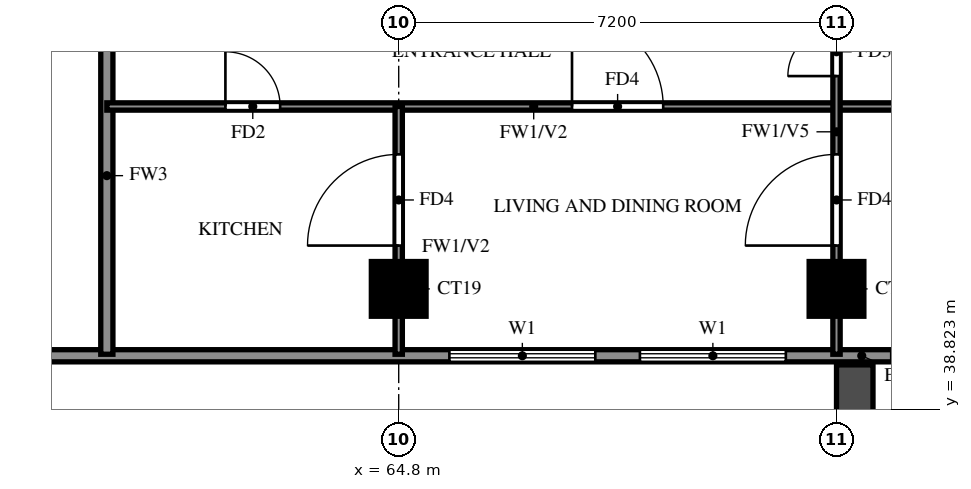
"""IFC4 building model, lengths in metres.
Left out: names, types, materials, properties, quantities, classifications, styles, units other than length and angle.
Written with IfcOpenShell. Run it as: python <this file> out.ifc"""

import sys

from ifc_helpers import new_model, si_unit, direction, frame, frame_2d, origin, origin_2d, place, context, subcontext, project, spatial, rectangle, extrude, source, transform, mapped, element, fill, save


model = new_model("IFC4")
c1 = context("Model", 3, precision=1e-05, world=origin(), true_north=direction((0.0, 1.0)))
c2 = subcontext(c1, "Body", "Model", "MODEL_VIEW")
j1 = project(units=[si_unit("LENGTHUNIT", "METRE"), si_unit("PLANEANGLEUNIT", "RADIAN")], contexts=[c1])
p1 = place(None, origin())
s1 = spatial("IfcSite", under=j1, at=p1, CompositionType="ELEMENT")
p2 = place(p1, origin())
s2 = spatial("IfcBuilding", under=s1, at=p2, CompositionType="ELEMENT")
p3 = place(p2, frame((0.0, 0.0, 199.0)))
s3 = spatial("IfcBuildingStorey", under=s2, at=p3, CompositionType="ELEMENT", Elevation=199.0)
m1 = source(origin(), c2, "Body", "SweptSolid", [
    extrude(rectangle(XDim=0.9, YDim=0.9, at=origin_2d()), origin(), (0.0, 0.0, 1.0), 3.2),
])
for number, where, z_axis, x_axis in (
    (1, (64.8, 40.8, 0.0), (0.0, 0.0, 1.0), (1.0, 0.0, 0.0)),
    (2, (72.0, 40.8, 0.0), (0.0, 0.0, 1.0), (1.0, 0.0, 0.0)),
):
    element("IfcColumn", number, at=place(p3, frame(where, z_axis=z_axis, x_axis=x_axis)), inside=s3, PredefinedType="COLUMN", context=c2, shape_type="MappedRepresentation", body=[
        mapped(m1, transform((0.0, 0.0, 0.0))),
    ])
p4 = place(p3, frame((85.719, 39.881, 0.0), z_axis=(0.0, 0.0, 1.0), x_axis=(-0.86377618652, 0.503875678716, 0.0)))
e3 = element("IfcWall", 3, at=p4, inside=s3, PredefinedType="SOLIDWALL", context=c2, shape_type="SweptSolid", body=[
    extrude(rectangle(XDim=16.311, YDim=0.2, at=frame_2d((8.156, 0.0))), origin(), (0.0, 0.0, 1.0), 3.2),
])
p5 = place(p4, frame((13.326, 0.0, 1.5)))
e4 = element("IfcOpeningElement", 4, at=p5, cuts=e3, PredefinedType="OPENING", context=c2, shape_type="SweptSolid", body=[
    extrude(rectangle(XDim=0.9, YDim=0.9, at=frame_2d((0.45, 0.45))), frame((0.0, 0.11, 0.0), z_axis=(0.0, -1.0, 0.0), x_axis=(1.0, 0.0, 0.0)), (0.0, 0.0, 1.0), 0.22),
])
p6 = place(p3, frame((58.8, 39.7, 0.0), z_axis=(0.0, 0.0, 1.0), x_axis=(1.0, 0.0, 0.0)))
e5 = element("IfcWall", 5, at=p6, inside=s3, PredefinedType="SOLIDWALL", context=c2, shape_type="SweptSolid", body=[
    extrude(rectangle(XDim=27.23, YDim=0.2, at=frame_2d((13.615, 0.0))), origin(), (0.0, 0.0, 1.0), 3.2),
])
p7 = place(p6, frame((15.9, 0.0, 0.0)))
e6 = element("IfcOpeningElement", 6, at=p7, cuts=e5, PredefinedType="OPENING", context=c2, shape_type="SweptSolid", body=[
    extrude(rectangle(XDim=1.8, YDim=2.4, at=frame_2d((0.9, 1.2))), frame((0.0, 0.11, 0.0), z_axis=(0.0, -1.0, 0.0), x_axis=(1.0, 0.0, 0.0)), (0.0, 0.0, 1.0), 0.22),
])
p8 = place(p6, frame((6.833, 0.0, 0.6)))
e7 = element("IfcOpeningElement", 7, at=p8, cuts=e5, PredefinedType="OPENING", context=c2, shape_type="SweptSolid", body=[
    extrude(rectangle(XDim=2.4, YDim=2.4, at=frame_2d((1.2, 1.2))), frame((0.0, 0.11, 0.0), z_axis=(0.0, -1.0, 0.0), x_axis=(1.0, 0.0, 0.0)), (0.0, 0.0, 1.0), 0.22),
])
p9 = place(p6, frame((9.967, 0.0, 0.6)))
e8 = element("IfcOpeningElement", 8, at=p9, cuts=e5, PredefinedType="OPENING", context=c2, shape_type="SweptSolid", body=[
    extrude(rectangle(XDim=2.4, YDim=2.4, at=frame_2d((1.2, 1.2))), frame((0.0, 0.11, 0.0), z_axis=(0.0, -1.0, 0.0), x_axis=(1.0, 0.0, 0.0)), (0.0, 0.0, 1.0), 0.22),
])
p10 = place(p6, frame((14.1, 0.0, 0.6)))
e9 = element("IfcOpeningElement", 9, at=p10, cuts=e5, PredefinedType="OPENING", context=c2, shape_type="SweptSolid", body=[
    extrude(rectangle(XDim=1.2, YDim=2.4, at=frame_2d((0.6, 1.2))), frame((0.0, 0.11, 0.0), z_axis=(0.0, -1.0, 0.0), x_axis=(1.0, 0.0, 0.0)), (0.0, 0.0, 1.0), 0.22),
])
p11 = place(p6, frame((18.3, 0.0, 0.6)))
e10 = element("IfcOpeningElement", 10, at=p11, cuts=e5, PredefinedType="OPENING", context=c2, shape_type="SweptSolid", body=[
    extrude(rectangle(XDim=1.2, YDim=2.4, at=frame_2d((0.6, 1.2))), frame((0.0, 0.11, 0.0), z_axis=(0.0, -1.0, 0.0), x_axis=(1.0, 0.0, 0.0)), (0.0, 0.0, 1.0), 0.22),
])
p12 = place(p6, frame((21.563, 0.0, 0.6)))
e11 = element("IfcOpeningElement", 11, at=p12, cuts=e5, PredefinedType="OPENING", context=c2, shape_type="SweptSolid", body=[
    extrude(rectangle(XDim=2.4, YDim=2.4, at=frame_2d((1.2, 1.2))), frame((0.0, 0.11, 0.0), z_axis=(0.0, -1.0, 0.0), x_axis=(1.0, 0.0, 0.0)), (0.0, 0.0, 1.0), 0.22),
])
p13 = place(p6, frame((25.978, 0.0, 0.6)))
e12 = element("IfcOpeningElement", 12, at=p13, cuts=e5, PredefinedType="OPENING", context=c2, shape_type="SweptSolid", body=[
    extrude(rectangle(XDim=0.9, YDim=2.4, at=frame_2d((0.45, 1.2))), frame((0.0, 0.11, 0.0), z_axis=(0.0, -1.0, 0.0), x_axis=(1.0, 0.0, 0.0)), (0.0, 0.0, 1.0), 0.22),
])
p14 = place(p3, frame((72.3, 39.55, 0.0), z_axis=(0.0, 0.0, 1.0), x_axis=(0.0, -1.0, 0.0)))
e13 = element("IfcWall", 13, at=p14, inside=s3, PredefinedType="SOLIDWALL", context=c2, shape_type="SweptSolid", body=[
    extrude(rectangle(XDim=2.65, YDim=0.6, at=frame_2d((1.325, 0.0))), origin(), (0.0, 0.0, 1.0), 2.85),
])
p15 = place(p3, frame((60.0, 39.725, 0.0), z_axis=(0.0, 0.0, 1.0), x_axis=(0.0, 1.0, 0.0)))
e14 = element("IfcWall", 14, at=p15, inside=s3, PredefinedType="SOLIDWALL", context=c2, shape_type="SweptSolid", body=[
    extrude(rectangle(XDim=5.875, YDim=0.2, at=frame_2d((2.938, 0.0))), origin(), (0.0, 0.0, 1.0), 3.2),
])
p16 = place(p3, frame((60.0, 43.8, 0.0), z_axis=(0.0, 0.0, 1.0), x_axis=(1.0, 0.0, 0.0)))
e15 = element("IfcWall", 15, at=p16, inside=s3, PredefinedType="PARTITIONING", context=c2, shape_type="SweptSolid", body=[
    extrude(rectangle(XDim=15.6, YDim=0.12, at=frame_2d((7.8, 0.0))), origin(), (0.0, 0.0, 1.0), 3.2),
])
p17 = place(p16, frame((7.65, 0.0, 0.0)))
e16 = element("IfcOpeningElement", 16, at=p17, cuts=e15, PredefinedType="OPENING", context=c2, shape_type="SweptSolid", body=[
    extrude(rectangle(XDim=1.5, YDim=2.1, at=frame_2d((0.75, 1.05))), frame((0.0, 0.07, 0.0), z_axis=(0.0, -1.0, 0.0), x_axis=(1.0, 0.0, 0.0)), (0.0, 0.0, 1.0), 0.14),
])
p18 = place(p16, frame((1.95, 0.0, 0.0)))
e17 = element("IfcOpeningElement", 17, at=p18, cuts=e15, PredefinedType="OPENING", context=c2, shape_type="SweptSolid", body=[
    extrude(rectangle(XDim=0.9, YDim=2.1, at=frame_2d((0.45, 1.05))), frame((0.0, 0.07, 0.0), z_axis=(0.0, -1.0, 0.0), x_axis=(1.0, 0.0, 0.0)), (0.0, 0.0, 1.0), 0.14),
])
p19 = place(p16, frame((13.4, 0.0, 0.0)))
e18 = element("IfcOpeningElement", 18, at=p19, cuts=e15, PredefinedType="OPENING", context=c2, shape_type="SweptSolid", body=[
    extrude(rectangle(XDim=0.8, YDim=2.1, at=frame_2d((0.4, 1.05))), frame((0.0, 0.07, 0.0), z_axis=(0.0, -1.0, 0.0), x_axis=(1.0, 0.0, 0.0)), (0.0, 0.0, 1.0), 0.14),
])
p20 = place(p3, frame((64.8, 39.725, 0.0), z_axis=(0.0, 0.0, 1.0), x_axis=(0.0, 1.0, 0.0)))
e19 = element("IfcWall", 19, at=p20, inside=s3, PredefinedType="PARTITIONING", context=c2, shape_type="SweptSolid", body=[
    extrude(rectangle(XDim=4.075, YDim=0.12, at=frame_2d((2.038, 0.0))), origin(), (0.0, 0.0, 1.0), 3.2),
])
p21 = place(p20, frame((1.788, 0.0, 0.0)))
e20 = element("IfcOpeningElement", 20, at=p21, cuts=e19, PredefinedType="OPENING", context=c2, shape_type="SweptSolid", body=[
    extrude(rectangle(XDim=1.5, YDim=2.1, at=frame_2d((0.75, 1.05))), frame((0.0, 0.07, 0.0), z_axis=(0.0, -1.0, 0.0), x_axis=(1.0, 0.0, 0.0)), (0.0, 0.0, 1.0), 0.14),
])
p22 = place(p3, frame((72.0, 39.725, 0.0), z_axis=(0.0, 0.0, 1.0), x_axis=(0.0, 1.0, 0.0)))
e21 = element("IfcWall", 21, at=p22, inside=s3, PredefinedType="PARTITIONING", context=c2, shape_type="SweptSolid", body=[
    extrude(rectangle(XDim=8.13, YDim=0.12, at=frame_2d((4.065, 0.0))), origin(), (0.0, 0.0, 1.0), 2.3),
])
p23 = place(p22, frame((1.788, 0.0, 0.0)))
e22 = element("IfcOpeningElement", 22, at=p23, cuts=e21, PredefinedType="OPENING", context=c2, shape_type="SweptSolid", body=[
    extrude(rectangle(XDim=1.5, YDim=2.1, at=frame_2d((0.75, 1.05))), frame((0.0, 0.07, 0.0), z_axis=(0.0, -1.0, 0.0), x_axis=(1.0, 0.0, 0.0)), (0.0, 0.0, 1.0), 0.14),
])
p24 = place(p22, frame((4.575, 0.0, 0.0)))
e23 = element("IfcOpeningElement", 23, at=p24, cuts=e21, PredefinedType="OPENING", context=c2, shape_type="SweptSolid", body=[
    extrude(rectangle(XDim=0.8, YDim=2.1, at=frame_2d((0.4, 1.05))), frame((0.0, 0.07, 0.0), z_axis=(0.0, -1.0, 0.0), x_axis=(1.0, 0.0, 0.0)), (0.0, 0.0, 1.0), 0.14),
])
p25 = place(p8, origin())
e24 = element("IfcWindow", 24, at=p25, inside=s3, PartitioningType="DOUBLE_PANEL_VERTICAL", PredefinedType="WINDOW", context=c2, shape_type="SweptSolid", body=[
    extrude(rectangle(XDim=2.4, YDim=2.4, at=frame_2d((1.2, 1.2))), frame((0.0, 0.03, 0.0), z_axis=(0.0, -1.0, 0.0), x_axis=(1.0, 0.0, 0.0)), (0.0, 0.0, 1.0), 0.06),
])
fill(e7, e24)
p26 = place(p9, origin())
e25 = element("IfcWindow", 25, at=p26, inside=s3, PartitioningType="DOUBLE_PANEL_VERTICAL", PredefinedType="WINDOW", context=c2, shape_type="SweptSolid", body=[
    extrude(rectangle(XDim=2.4, YDim=2.4, at=frame_2d((1.2, 1.2))), frame((0.0, 0.03, 0.0), z_axis=(0.0, -1.0, 0.0), x_axis=(1.0, 0.0, 0.0)), (0.0, 0.0, 1.0), 0.06),
])
fill(e8, e25)
p27 = place(p21, origin())
e26 = element("IfcDoor", 26, at=p27, inside=s3, OperationType="SINGLE_SWING_RIGHT", PredefinedType="DOOR", context=c2, shape_type="SweptSolid", body=[
    extrude(rectangle(XDim=1.5, YDim=2.1, at=frame_2d((0.75, 1.05))), frame((0.0, 0.025, 0.0), z_axis=(0.0, -1.0, 0.0), x_axis=(1.0, 0.0, 0.0)), (0.0, 0.0, 1.0), 0.05),
])
fill(e20, e26)
p28 = place(p17, origin())
e27 = element("IfcDoor", 27, at=p28, inside=s3, OperationType="SINGLE_SWING_LEFT", PredefinedType="DOOR", context=c2, shape_type="SweptSolid", body=[
    extrude(rectangle(XDim=1.5, YDim=2.1, at=frame_2d((0.75, 1.05))), frame((0.0, 0.025, 0.0), z_axis=(0.0, -1.0, 0.0), x_axis=(1.0, 0.0, 0.0)), (0.0, 0.0, 1.0), 0.05),
])
fill(e16, e27)
p29 = place(p18, origin())
e28 = element("IfcDoor", 28, at=p29, inside=s3, OperationType="SINGLE_SWING_RIGHT", PredefinedType="DOOR", context=c2, shape_type="SweptSolid", body=[
    extrude(rectangle(XDim=0.9, YDim=2.1, at=frame_2d((0.45, 1.05))), frame((0.0, 0.025, 0.0), z_axis=(0.0, -1.0, 0.0), x_axis=(1.0, 0.0, 0.0)), (0.0, 0.0, 1.0), 0.05),
])
fill(e17, e28)
p30 = place(p23, origin())
e29 = element("IfcDoor", 29, at=p30, inside=s3, OperationType="SINGLE_SWING_RIGHT", PredefinedType="DOOR", context=c2, shape_type="SweptSolid", body=[
    extrude(rectangle(XDim=1.5, YDim=2.1, at=frame_2d((0.75, 1.05))), frame((0.0, 0.025, 0.0), z_axis=(0.0, -1.0, 0.0), x_axis=(1.0, 0.0, 0.0)), (0.0, 0.0, 1.0), 0.05),
])
fill(e22, e29)
p31 = place(p24, origin())
e30 = element("IfcDoor", 30, at=p31, inside=s3, OperationType="SINGLE_SWING_LEFT", PredefinedType="DOOR", context=c2, shape_type="SweptSolid", body=[
    extrude(rectangle(XDim=0.8, YDim=2.1, at=frame_2d((0.4, 1.05))), frame((0.0, 0.025, 0.0), z_axis=(0.0, -1.0, 0.0), x_axis=(1.0, 0.0, 0.0)), (0.0, 0.0, 1.0), 0.05),
])
fill(e23, e30)
save(model, sys.argv[1])
